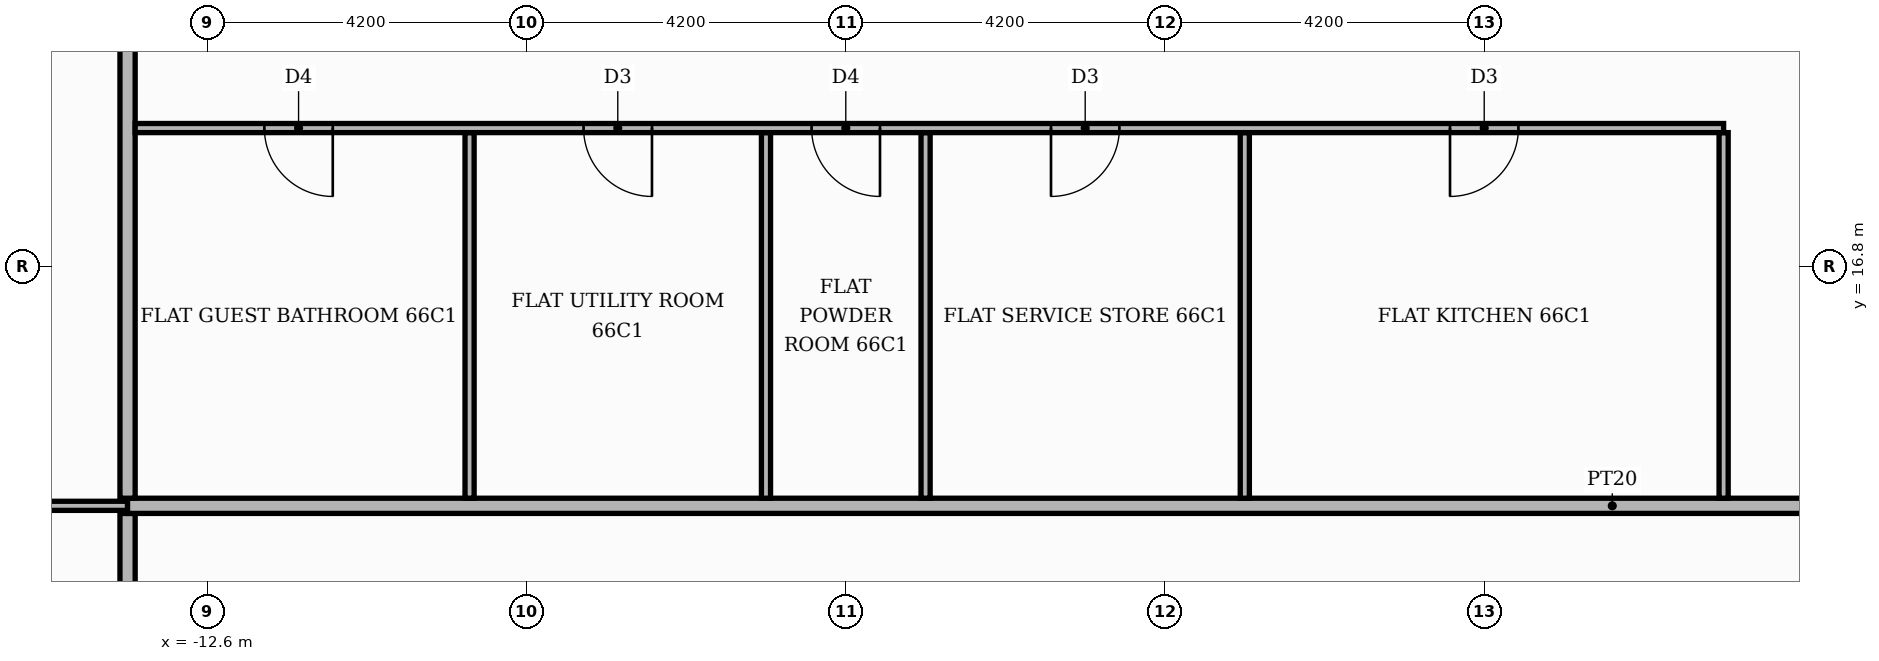
"""IFC4 building model, lengths in metres.
Left out: names, types, materials, properties, quantities, classifications, styles, units other than length and angle.
Written with IfcOpenShell. Run it as: python <this file> out.ifc"""

import sys

from ifc_helpers import new_model, si_unit, direction, frame, frame_2d, origin, place, context, subcontext, project, spatial, rectangle, extrude, element, fill, save


model = new_model("IFC4")
c1 = context("Model", 3, precision=1e-05, world=origin(), true_north=direction((0.0, 1.0)))
c2 = subcontext(c1, "Body", "Model", "MODEL_VIEW")
j1 = project(units=[si_unit("LENGTHUNIT", "METRE"), si_unit("PLANEANGLEUNIT", "RADIAN")], contexts=[c1])
p1 = place(None, origin())
s1 = spatial("IfcSite", under=j1, at=p1, CompositionType="ELEMENT")
p2 = place(p1, origin())
s2 = spatial("IfcBuilding", under=s1, at=p2, CompositionType="ELEMENT")
p3 = place(p2, frame((0.0, 0.0, 275.7)))
s3 = spatial("IfcBuildingStorey", under=s2, at=p3, CompositionType="ELEMENT", Elevation=275.7)
p4 = place(p3, frame((-13.65, 11.1, 0.0), z_axis=(0.0, 0.0, 1.0), x_axis=(0.0, 1.0, 0.0)))
e1 = element("IfcWall", 1, at=p4, inside=s3, PredefinedType="PARTITIONING", context=c2, shape_type="SweptSolid", body=[
    extrude(rectangle(XDim=2.45, YDim=0.2, at=frame_2d((1.225, 0.0))), origin(), (0.0, 0.0, 1.0), 3.48),
])
p5 = place(p3, frame((-20.72, 13.65, 0.0), z_axis=(0.0, 0.0, 1.0), x_axis=(1.0, 0.0, 0.0)))
e2 = element("IfcWall", 2, at=p5, inside=s3, PredefinedType="PARTITIONING", context=c2, shape_type="SweptSolid", body=[
    extrude(rectangle(XDim=7.07, YDim=0.12, at=frame_2d((3.535, 0.0))), origin(), (0.0, 0.0, 1.0), 3.48),
])
p6 = place(p5, frame((3.085, 0.0, 0.0)))
e3 = element("IfcOpeningElement", 3, at=p6, cuts=e2, PredefinedType="OPENING", context=c2, shape_type="SweptSolid", body=[
    extrude(rectangle(XDim=0.9, YDim=2.1, at=frame_2d((0.45, 1.05))), frame((0.0, 0.07, 0.0), z_axis=(0.0, -1.0, 0.0), x_axis=(1.0, 0.0, 0.0)), (0.0, 0.0, 1.0), 0.14),
])
p7 = place(p3, frame((-13.65, 13.65, 0.0), z_axis=(0.0, 0.0, 1.0), x_axis=(1.0, 0.0, 0.0)))
e4 = element("IfcWall", 4, at=p7, inside=s3, PredefinedType="PARTITIONING", context=c2, shape_type="SweptSolid", body=[
    extrude(rectangle(XDim=39.07, YDim=0.2, at=frame_2d((19.535, 0.0))), origin(), (0.0, 0.0, 1.0), 3.48),
])
p8 = place(p7, frame((23.6, 0.0, 0.0)))
e5 = element("IfcOpeningElement", 5, at=p8, cuts=e4, PredefinedType="OPENING", context=c2, shape_type="SweptSolid", body=[
    extrude(rectangle(XDim=1.1, YDim=2.4, at=frame_2d((0.55, 1.2))), frame((0.0, 0.11, 0.0), z_axis=(0.0, -1.0, 0.0), x_axis=(1.0, 0.0, 0.0)), (0.0, 0.0, 1.0), 0.22),
])
p9 = place(p3, frame((-13.65, 13.75, 0.0), z_axis=(0.0, 0.0, 1.0), x_axis=(0.0, 1.0, 0.0)))
e6 = element("IfcWall", 6, at=p9, inside=s3, PredefinedType="PARTITIONING", context=c2, shape_type="SweptSolid", body=[
    extrude(rectangle(XDim=11.67, YDim=0.2, at=frame_2d((5.835, 0.0))), origin(), (0.0, 0.0, 1.0), 3.48),
])
for number, where, z_axis, x_axis in (
    (7, (-9.15, 13.75, 0.0), (0.0, 0.0, 1.0), (0.0, 1.0, 0.0)),
    (8, (-5.25, 13.75, 0.0), (0.0, 0.0, 1.0), (0.0, 1.0, 0.0)),
    (9, (-3.15, 13.75, 0.0), (0.0, 0.0, 1.0), (0.0, 1.0, 0.0)),
    (10, (1.05, 13.75, 0.0), (0.0, 0.0, 1.0), (0.0, 1.0, 0.0)),
    (11, (7.35, 13.75, 0.0), (0.0, 0.0, 1.0), (0.0, 1.0, 0.0)),
):
    element("IfcWall", number, at=place(p3, frame(where, z_axis=z_axis, x_axis=x_axis)), inside=s3, PredefinedType="PARTITIONING", context=c2, shape_type="SweptSolid", body=[
        extrude(rectangle(XDim=4.81, YDim=0.12, at=frame_2d((2.405, 0.0))), origin(), (0.0, 0.0, 1.0), 3.48),
    ])
p10 = place(p3, frame((-13.55, 18.62, 0.0), z_axis=(0.0, 0.0, 1.0), x_axis=(1.0, 0.0, 0.0)))
e12 = element("IfcWall", 12, at=p10, inside=s3, PredefinedType="PARTITIONING", context=c2, shape_type="SweptSolid", body=[
    extrude(rectangle(XDim=20.9, YDim=0.12, at=frame_2d((10.45, 0.0))), origin(), (0.0, 0.0, 1.0), 3.48),
])
p11 = place(p10, frame((17.3, 0.0, 0.0)))
e13 = element("IfcOpeningElement", 13, at=p11, cuts=e12, PredefinedType="OPENING", context=c2, shape_type="SweptSolid", body=[
    extrude(rectangle(XDim=0.9, YDim=2.1, at=frame_2d((0.45, 1.05))), frame((0.0, 0.07, 0.0), z_axis=(0.0, -1.0, 0.0), x_axis=(1.0, 0.0, 0.0)), (0.0, 0.0, 1.0), 0.14),
])
p12 = place(p10, frame((12.05, 0.0, 0.0)))
e14 = element("IfcOpeningElement", 14, at=p12, cuts=e12, PredefinedType="OPENING", context=c2, shape_type="SweptSolid", body=[
    extrude(rectangle(XDim=0.9, YDim=2.1, at=frame_2d((0.45, 1.05))), frame((0.0, 0.07, 0.0), z_axis=(0.0, -1.0, 0.0), x_axis=(1.0, 0.0, 0.0)), (0.0, 0.0, 1.0), 0.14),
])
p13 = place(p10, frame((8.9, 0.0, 0.0)))
e15 = element("IfcOpeningElement", 15, at=p13, cuts=e12, PredefinedType="OPENING", context=c2, shape_type="SweptSolid", body=[
    extrude(rectangle(XDim=0.9, YDim=2.1, at=frame_2d((0.45, 1.05))), frame((0.0, 0.07, 0.0), z_axis=(0.0, -1.0, 0.0), x_axis=(1.0, 0.0, 0.0)), (0.0, 0.0, 1.0), 0.14),
])
p14 = place(p10, frame((5.9, 0.0, 0.0)))
e16 = element("IfcOpeningElement", 16, at=p14, cuts=e12, PredefinedType="OPENING", context=c2, shape_type="SweptSolid", body=[
    extrude(rectangle(XDim=0.9, YDim=2.1, at=frame_2d((0.45, 1.05))), frame((0.0, 0.07, 0.0), z_axis=(0.0, -1.0, 0.0), x_axis=(1.0, 0.0, 0.0)), (0.0, 0.0, 1.0), 0.14),
])
p15 = place(p10, frame((1.7, 0.0, 0.0)))
e17 = element("IfcOpeningElement", 17, at=p15, cuts=e12, PredefinedType="OPENING", context=c2, shape_type="SweptSolid", body=[
    extrude(rectangle(XDim=0.9, YDim=2.1, at=frame_2d((0.45, 1.05))), frame((0.0, 0.07, 0.0), z_axis=(0.0, -1.0, 0.0), x_axis=(1.0, 0.0, 0.0)), (0.0, 0.0, 1.0), 0.14),
])
p16 = place(p11, frame((0.9, 0.0, 0.0), z_axis=(0.0, 0.0, 1.0), x_axis=(-1.0, 0.0, 0.0)))
e18 = element("IfcDoor", 18, at=p16, inside=s3, OperationType="SINGLE_SWING_LEFT", PredefinedType="DOOR", context=c2, shape_type="SweptSolid", body=[
    extrude(rectangle(XDim=0.9, YDim=2.1, at=frame_2d((0.45, 1.05))), frame((0.0, 0.025, 0.0), z_axis=(0.0, -1.0, 0.0), x_axis=(1.0, 0.0, 0.0)), (0.0, 0.0, 1.0), 0.05),
])
fill(e13, e18)
p17 = place(p12, frame((0.9, 0.0, 0.0), z_axis=(0.0, 0.0, 1.0), x_axis=(-1.0, 0.0, 0.0)))
e19 = element("IfcDoor", 19, at=p17, inside=s3, OperationType="SINGLE_SWING_LEFT", PredefinedType="DOOR", context=c2, shape_type="SweptSolid", body=[
    extrude(rectangle(XDim=0.9, YDim=2.1, at=frame_2d((0.45, 1.05))), frame((0.0, 0.025, 0.0), z_axis=(0.0, -1.0, 0.0), x_axis=(1.0, 0.0, 0.0)), (0.0, 0.0, 1.0), 0.05),
])
fill(e14, e19)
p18 = place(p13, frame((0.9, 0.0, 0.0), z_axis=(0.0, 0.0, 1.0), x_axis=(-1.0, 0.0, 0.0)))
e20 = element("IfcDoor", 20, at=p18, inside=s3, OperationType="SINGLE_SWING_RIGHT", PredefinedType="DOOR", context=c2, shape_type="SweptSolid", body=[
    extrude(rectangle(XDim=0.9, YDim=2.1, at=frame_2d((0.45, 1.05))), frame((0.0, 0.025, 0.0), z_axis=(0.0, -1.0, 0.0), x_axis=(1.0, 0.0, 0.0)), (0.0, 0.0, 1.0), 0.05),
])
fill(e15, e20)
p19 = place(p14, frame((0.9, 0.0, 0.0), z_axis=(0.0, 0.0, 1.0), x_axis=(-1.0, 0.0, 0.0)))
e21 = element("IfcDoor", 21, at=p19, inside=s3, OperationType="SINGLE_SWING_RIGHT", PredefinedType="DOOR", context=c2, shape_type="SweptSolid", body=[
    extrude(rectangle(XDim=0.9, YDim=2.1, at=frame_2d((0.45, 1.05))), frame((0.0, 0.025, 0.0), z_axis=(0.0, -1.0, 0.0), x_axis=(1.0, 0.0, 0.0)), (0.0, 0.0, 1.0), 0.05),
])
fill(e16, e21)
p20 = place(p15, frame((0.9, 0.0, 0.0), z_axis=(0.0, 0.0, 1.0), x_axis=(-1.0, 0.0, 0.0)))
e22 = element("IfcDoor", 22, at=p20, inside=s3, OperationType="SINGLE_SWING_RIGHT", PredefinedType="DOOR", context=c2, shape_type="SweptSolid", body=[
    extrude(rectangle(XDim=0.9, YDim=2.1, at=frame_2d((0.45, 1.05))), frame((0.0, 0.025, 0.0), z_axis=(0.0, -1.0, 0.0), x_axis=(1.0, 0.0, 0.0)), (0.0, 0.0, 1.0), 0.05),
])
fill(e17, e22)
save(model, sys.argv[1])
